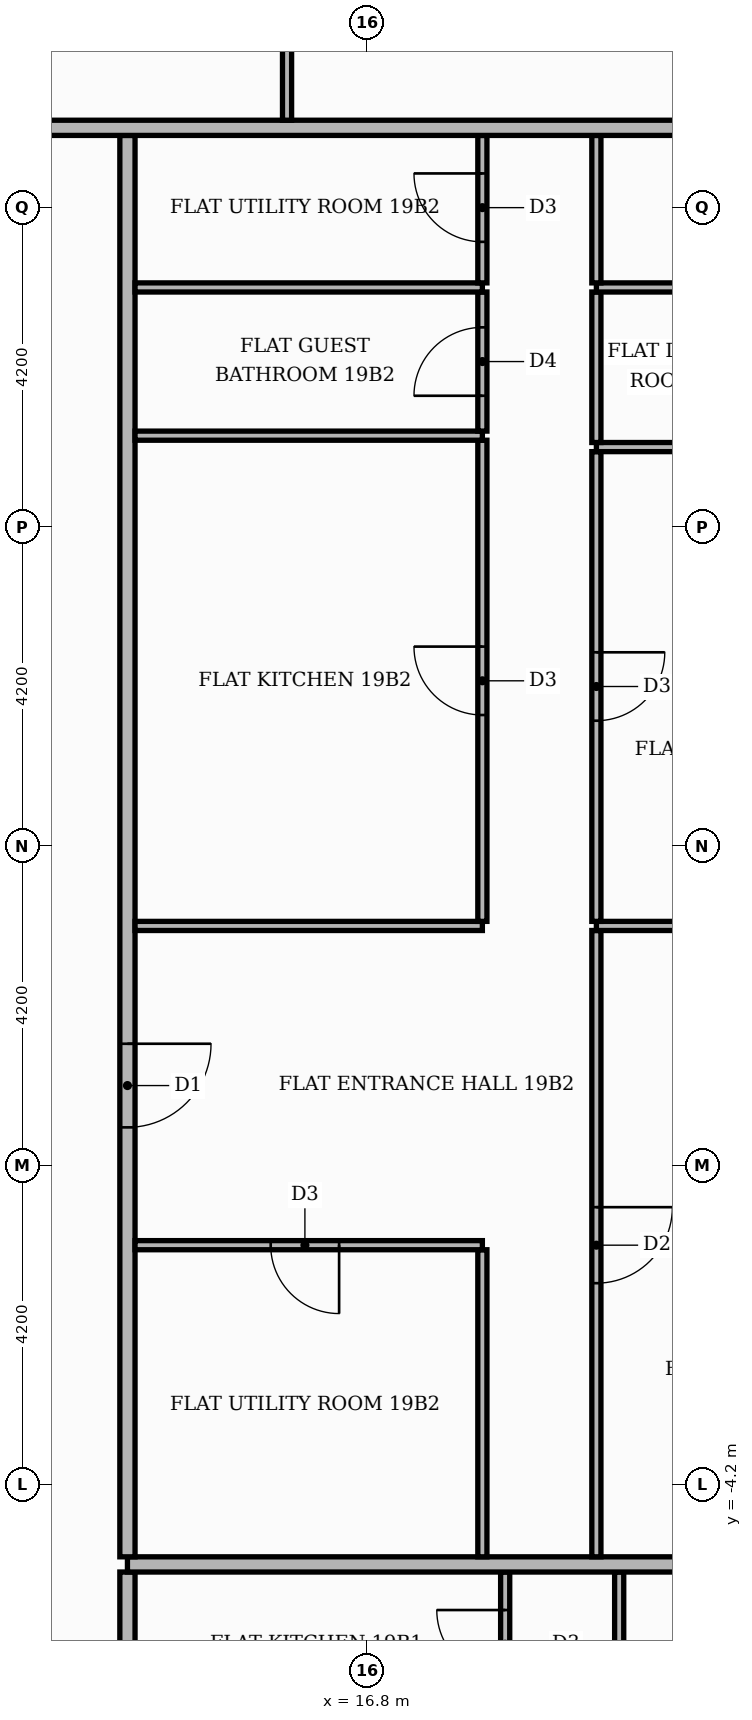
"""IFC4 building model, lengths in metres.
Left out: names, types, materials, properties, quantities, classifications, styles, units other than length and angle.
Written with IfcOpenShell. Run it as: python <this file> out.ifc"""

import sys

from ifc_helpers import new_model, si_unit, direction, frame, frame_2d, origin, place, context, subcontext, project, spatial, rectangle, extrude, element, fill, save


model = new_model("IFC4")
c1 = context("Model", 3, precision=1e-05, world=origin(), true_north=direction((0.0, 1.0)))
c2 = subcontext(c1, "Body", "Model", "MODEL_VIEW")
j1 = project(units=[si_unit("LENGTHUNIT", "METRE"), si_unit("PLANEANGLEUNIT", "RADIAN")], contexts=[c1])
p1 = place(None, origin())
s1 = spatial("IfcSite", under=j1, at=p1, CompositionType="ELEMENT")
p2 = place(p1, origin())
s2 = spatial("IfcBuilding", under=s1, at=p2, CompositionType="ELEMENT")
p3 = place(p2, frame((0.0, 0.0, 83.1)))
s3 = spatial("IfcBuildingStorey", under=s2, at=p3, CompositionType="ELEMENT", Elevation=83.1)
p4 = place(p3, frame((13.65, -13.55, 0.0), z_axis=(0.0, 0.0, 1.0), x_axis=(0.0, 1.0, 0.0)))
e1 = element("IfcWall", 1, at=p4, inside=s3, PredefinedType="PARTITIONING", context=c2, shape_type="SweptSolid", body=[
    extrude(rectangle(XDim=8.2, YDim=0.2, at=frame_2d((4.1, 0.0))), origin(), (0.0, 0.0, 1.0), 3.48),
])
p5 = place(p4, frame((1.45, 0.0, 0.0)))
e2 = element("IfcOpeningElement", 2, at=p5, cuts=e1, PredefinedType="OPENING", context=c2, shape_type="SweptSolid", body=[
    extrude(rectangle(XDim=1.1, YDim=2.4, at=frame_2d((0.55, 1.2))), frame((0.0, 0.11, 0.0), z_axis=(0.0, -1.0, 0.0), x_axis=(1.0, 0.0, 0.0)), (0.0, 0.0, 1.0), 0.22),
])
p6 = place(p3, frame((18.62, -7.29, 0.0), z_axis=(0.0, 0.0, 1.0), x_axis=(0.0, 1.0, 0.0)))
e3 = element("IfcWall", 3, at=p6, inside=s3, PredefinedType="PARTITIONING", context=c2, shape_type="SweptSolid", body=[
    extrude(rectangle(XDim=1.94, YDim=0.12, at=frame_2d((0.97, 0.0))), origin(), (0.0, 0.0, 1.0), 3.48),
])
p7 = place(p6, frame((0.54, 0.0, 0.0)))
e4 = element("IfcOpeningElement", 4, at=p7, cuts=e3, PredefinedType="OPENING", context=c2, shape_type="SweptSolid", body=[
    extrude(rectangle(XDim=0.9, YDim=2.1, at=frame_2d((0.45, 1.05))), frame((0.0, 0.07, 0.0), z_axis=(0.0, -1.0, 0.0), x_axis=(1.0, 0.0, 0.0)), (0.0, 0.0, 1.0), 0.14),
])
p8 = place(p3, frame((20.12, -7.29, 0.0), z_axis=(0.0, 0.0, 1.0), x_axis=(0.0, 1.0, 0.0)))
e5 = element("IfcWall", 5, at=p8, inside=s3, PredefinedType="PARTITIONING", context=c2, shape_type="SweptSolid", body=[
    extrude(rectangle(XDim=1.94, YDim=0.12, at=frame_2d((0.97, 0.0))), origin(), (0.0, 0.0, 1.0), 3.48),
])
p9 = place(p3, frame((13.65, -5.25, 0.0), z_axis=(0.0, 0.0, 1.0), x_axis=(1.0, 0.0, 0.0)))
e6 = element("IfcWall", 6, at=p9, inside=s3, PredefinedType="PARTITIONING", context=c2, shape_type="SweptSolid", body=[
    extrude(rectangle(XDim=11.77, YDim=0.2, at=frame_2d((5.885, 0.0))), origin(), (0.0, 0.0, 1.0), 3.48),
])
p10 = place(p3, frame((13.65, -5.15, 0.0), z_axis=(0.0, 0.0, 1.0), x_axis=(0.0, 1.0, 0.0)))
e7 = element("IfcWall", 7, at=p10, inside=s3, PredefinedType="PARTITIONING", context=c2, shape_type="SweptSolid", body=[
    extrude(rectangle(XDim=18.7, YDim=0.2, at=frame_2d((9.35, 0.0))), origin(), (0.0, 0.0, 1.0), 3.48),
])
p11 = place(p10, frame((5.65, 0.0, 0.0)))
e8 = element("IfcOpeningElement", 8, at=p11, cuts=e7, PredefinedType="OPENING", context=c2, shape_type="SweptSolid", body=[
    extrude(rectangle(XDim=1.1, YDim=2.4, at=frame_2d((0.55, 1.2))), frame((0.0, 0.11, 0.0), z_axis=(0.0, -1.0, 0.0), x_axis=(1.0, 0.0, 0.0)), (0.0, 0.0, 1.0), 0.22),
])
p12 = place(p3, frame((18.32, -5.15, 0.0), z_axis=(0.0, 0.0, 1.0), x_axis=(0.0, 1.0, 0.0)))
e9 = element("IfcWall", 9, at=p12, inside=s3, PredefinedType="PARTITIONING", context=c2, shape_type="SweptSolid", body=[
    extrude(rectangle(XDim=4.04, YDim=0.12, at=frame_2d((2.02, 0.0))), origin(), (0.0, 0.0, 1.0), 3.48),
])
p13 = place(p3, frame((19.82, -5.15, 0.0), z_axis=(0.0, 0.0, 1.0), x_axis=(0.0, 1.0, 0.0)))
e10 = element("IfcWall", 10, at=p13, inside=s3, PredefinedType="PARTITIONING", context=c2, shape_type="SweptSolid", body=[
    extrude(rectangle(XDim=8.24, YDim=0.12, at=frame_2d((4.12, 0.0))), origin(), (0.0, 0.0, 1.0), 3.48),
])
p14 = place(p13, frame((3.6, 0.0, 0.0)))
e11 = element("IfcOpeningElement", 11, at=p14, cuts=e10, PredefinedType="OPENING", context=c2, shape_type="SweptSolid", body=[
    extrude(rectangle(XDim=1.0, YDim=2.1, at=frame_2d((0.5, 1.05))), frame((0.0, 0.07, 0.0), z_axis=(0.0, -1.0, 0.0), x_axis=(1.0, 0.0, 0.0)), (0.0, 0.0, 1.0), 0.14),
])
p15 = place(p3, frame((13.75, -1.05, 0.0), z_axis=(0.0, 0.0, 1.0), x_axis=(1.0, 0.0, 0.0)))
e12 = element("IfcWall", 12, at=p15, inside=s3, PredefinedType="PARTITIONING", context=c2, shape_type="SweptSolid", body=[
    extrude(rectangle(XDim=4.57, YDim=0.12, at=frame_2d((2.285, 0.0))), origin(), (0.0, 0.0, 1.0), 3.48),
])
p16 = place(p15, frame((1.785, 0.0, 0.0)))
e13 = element("IfcOpeningElement", 13, at=p16, cuts=e12, PredefinedType="OPENING", context=c2, shape_type="SweptSolid", body=[
    extrude(rectangle(XDim=0.9, YDim=2.1, at=frame_2d((0.45, 1.05))), frame((0.0, 0.07, 0.0), z_axis=(0.0, -1.0, 0.0), x_axis=(1.0, 0.0, 0.0)), (0.0, 0.0, 1.0), 0.14),
])
p17 = place(p3, frame((13.75, 3.15, 0.0), z_axis=(0.0, 0.0, 1.0), x_axis=(1.0, 0.0, 0.0)))
e14 = element("IfcWall", 14, at=p17, inside=s3, PredefinedType="PARTITIONING", context=c2, shape_type="SweptSolid", body=[
    extrude(rectangle(XDim=4.57, YDim=0.12, at=frame_2d((2.285, 0.0))), origin(), (0.0, 0.0, 1.0), 3.48),
])
p18 = place(p3, frame((19.82, 3.15, 0.0), z_axis=(0.0, 0.0, 1.0), x_axis=(1.0, 0.0, 0.0)))
e15 = element("IfcWall", 15, at=p18, inside=s3, PredefinedType="PARTITIONING", context=c2, shape_type="SweptSolid", body=[
    extrude(rectangle(XDim=5.6, YDim=0.12, at=frame_2d((2.8, 0.0))), origin(), (0.0, 0.0, 1.0), 3.48),
])
p19 = place(p3, frame((18.32, 3.21, 0.0), z_axis=(0.0, 0.0, 1.0), x_axis=(0.0, 1.0, 0.0)))
e16 = element("IfcWall", 16, at=p19, inside=s3, PredefinedType="PARTITIONING", context=c2, shape_type="SweptSolid", body=[
    extrude(rectangle(XDim=6.33, YDim=0.12, at=frame_2d((3.165, 0.0))), origin(), (0.0, 0.0, 1.0), 3.48),
])
p20 = place(p19, frame((2.715, 0.0, 0.0)))
e17 = element("IfcOpeningElement", 17, at=p20, cuts=e16, PredefinedType="OPENING", context=c2, shape_type="SweptSolid", body=[
    extrude(rectangle(XDim=0.9, YDim=2.1, at=frame_2d((0.45, 1.05))), frame((0.0, 0.07, 0.0), z_axis=(0.0, -1.0, 0.0), x_axis=(1.0, 0.0, 0.0)), (0.0, 0.0, 1.0), 0.14),
])
p21 = place(p3, frame((19.82, 3.21, 0.0), z_axis=(0.0, 0.0, 1.0), x_axis=(0.0, 1.0, 0.0)))
e18 = element("IfcWall", 18, at=p21, inside=s3, PredefinedType="PARTITIONING", context=c2, shape_type="SweptSolid", body=[
    extrude(rectangle(XDim=6.18, YDim=0.12, at=frame_2d((3.09, 0.0))), origin(), (0.0, 0.0, 1.0), 3.48),
])
p22 = place(p21, frame((2.64, 0.0, 0.0)))
e19 = element("IfcOpeningElement", 19, at=p22, cuts=e18, PredefinedType="OPENING", context=c2, shape_type="SweptSolid", body=[
    extrude(rectangle(XDim=0.9, YDim=2.1, at=frame_2d((0.45, 1.05))), frame((0.0, 0.07, 0.0), z_axis=(0.0, -1.0, 0.0), x_axis=(1.0, 0.0, 0.0)), (0.0, 0.0, 1.0), 0.14),
])
p23 = place(p3, frame((19.82, 9.45, 0.0), z_axis=(0.0, 0.0, 1.0), x_axis=(1.0, 0.0, 0.0)))
e20 = element("IfcWall", 20, at=p23, inside=s3, PredefinedType="PARTITIONING", context=c2, shape_type="SweptSolid", body=[
    extrude(rectangle(XDim=5.6, YDim=0.12, at=frame_2d((2.8, 0.0))), origin(), (0.0, 0.0, 1.0), 3.48),
])
p24 = place(p23, frame((2.5, 0.0, 0.0)))
e21 = element("IfcOpeningElement", 21, at=p24, cuts=e20, PredefinedType="OPENING", context=c2, shape_type="SweptSolid", body=[
    extrude(rectangle(XDim=0.9, YDim=2.1, at=frame_2d((0.45, 1.05))), frame((0.0, 0.07, 0.0), z_axis=(0.0, -1.0, 0.0), x_axis=(1.0, 0.0, 0.0)), (0.0, 0.0, 1.0), 0.14),
])
p25 = place(p3, frame((19.82, 9.51, 0.0), z_axis=(0.0, 0.0, 1.0), x_axis=(0.0, 1.0, 0.0)))
e22 = element("IfcWall", 22, at=p25, inside=s3, PredefinedType="PARTITIONING", context=c2, shape_type="SweptSolid", body=[
    extrude(rectangle(XDim=1.98, YDim=0.12, at=frame_2d((0.99, 0.0))), origin(), (0.0, 0.0, 1.0), 3.48),
])
p26 = place(p3, frame((13.75, 9.6, 0.0), z_axis=(0.0, 0.0, 1.0), x_axis=(1.0, 0.0, 0.0)))
e23 = element("IfcWall", 23, at=p26, inside=s3, PredefinedType="PARTITIONING", context=c2, shape_type="SweptSolid", body=[
    extrude(rectangle(XDim=4.57, YDim=0.12, at=frame_2d((2.285, 0.0))), origin(), (0.0, 0.0, 1.0), 3.48),
])
p27 = place(p3, frame((18.32, 9.66, 0.0), z_axis=(0.0, 0.0, 1.0), x_axis=(0.0, 1.0, 0.0)))
e24 = element("IfcWall", 24, at=p27, inside=s3, PredefinedType="PARTITIONING", context=c2, shape_type="SweptSolid", body=[
    extrude(rectangle(XDim=1.83, YDim=0.12, at=frame_2d((0.915, 0.0))), origin(), (0.0, 0.0, 1.0), 3.48),
])
p28 = place(p27, frame((0.465, 0.0, 0.0)))
e25 = element("IfcOpeningElement", 25, at=p28, cuts=e24, PredefinedType="OPENING", context=c2, shape_type="SweptSolid", body=[
    extrude(rectangle(XDim=0.9, YDim=2.1, at=frame_2d((0.45, 1.05))), frame((0.0, 0.07, 0.0), z_axis=(0.0, -1.0, 0.0), x_axis=(1.0, 0.0, 0.0)), (0.0, 0.0, 1.0), 0.14),
])
p29 = place(p3, frame((13.75, 11.55, 0.0), z_axis=(0.0, 0.0, 1.0), x_axis=(1.0, 0.0, 0.0)))
e26 = element("IfcWall", 26, at=p29, inside=s3, PredefinedType="PARTITIONING", context=c2, shape_type="SweptSolid", body=[
    extrude(rectangle(XDim=4.57, YDim=0.12, at=frame_2d((2.285, 0.0))), origin(), (0.0, 0.0, 1.0), 3.48),
])
p30 = place(p3, frame((19.82, 11.55, 0.0), z_axis=(0.0, 0.0, 1.0), x_axis=(1.0, 0.0, 0.0)))
e27 = element("IfcWall", 27, at=p30, inside=s3, PredefinedType="PARTITIONING", context=c2, shape_type="SweptSolid", body=[
    extrude(rectangle(XDim=5.6, YDim=0.12, at=frame_2d((2.8, 0.0))), origin(), (0.0, 0.0, 1.0), 3.48),
])
p31 = place(p30, frame((2.5, 0.0, 0.0)))
e28 = element("IfcOpeningElement", 28, at=p31, cuts=e27, PredefinedType="OPENING", context=c2, shape_type="SweptSolid", body=[
    extrude(rectangle(XDim=0.9, YDim=2.1, at=frame_2d((0.45, 1.05))), frame((0.0, 0.07, 0.0), z_axis=(0.0, -1.0, 0.0), x_axis=(1.0, 0.0, 0.0)), (0.0, 0.0, 1.0), 0.14),
])
p32 = place(p3, frame((18.32, 11.61, 0.0), z_axis=(0.0, 0.0, 1.0), x_axis=(0.0, 1.0, 0.0)))
e29 = element("IfcWall", 29, at=p32, inside=s3, PredefinedType="PARTITIONING", context=c2, shape_type="SweptSolid", body=[
    extrude(rectangle(XDim=1.94, YDim=0.12, at=frame_2d((0.97, 0.0))), origin(), (0.0, 0.0, 1.0), 3.48),
])
p33 = place(p32, frame((0.54, 0.0, 0.0)))
e30 = element("IfcOpeningElement", 30, at=p33, cuts=e29, PredefinedType="OPENING", context=c2, shape_type="SweptSolid", body=[
    extrude(rectangle(XDim=0.9, YDim=2.1, at=frame_2d((0.45, 1.05))), frame((0.0, 0.07, 0.0), z_axis=(0.0, -1.0, 0.0), x_axis=(1.0, 0.0, 0.0)), (0.0, 0.0, 1.0), 0.14),
])
p34 = place(p3, frame((19.82, 11.61, 0.0), z_axis=(0.0, 0.0, 1.0), x_axis=(0.0, 1.0, 0.0)))
e31 = element("IfcWall", 31, at=p34, inside=s3, PredefinedType="PARTITIONING", context=c2, shape_type="SweptSolid", body=[
    extrude(rectangle(XDim=1.94, YDim=0.12, at=frame_2d((0.97, 0.0))), origin(), (0.0, 0.0, 1.0), 3.48),
])
p35 = place(p3, frame((-13.65, 13.65, 0.0), z_axis=(0.0, 0.0, 1.0), x_axis=(1.0, 0.0, 0.0)))
e32 = element("IfcWall", 32, at=p35, inside=s3, PredefinedType="PARTITIONING", context=c2, shape_type="SweptSolid", body=[
    extrude(rectangle(XDim=39.07, YDim=0.2, at=frame_2d((19.535, 0.0))), origin(), (0.0, 0.0, 1.0), 3.48),
])
p36 = place(p35, frame((24.65, 0.0, 0.0)))
e33 = element("IfcOpeningElement", 33, at=p36, cuts=e32, PredefinedType="OPENING", context=c2, shape_type="SweptSolid", body=[
    extrude(rectangle(XDim=1.1, YDim=2.4, at=frame_2d((0.55, 1.2))), frame((0.0, 0.11, 0.0), z_axis=(0.0, -1.0, 0.0), x_axis=(1.0, 0.0, 0.0)), (0.0, 0.0, 1.0), 0.22),
])
p37 = place(p35, frame((16.25, 0.0, 0.0)))
e34 = element("IfcOpeningElement", 34, at=p37, cuts=e32, PredefinedType="OPENING", context=c2, shape_type="SweptSolid", body=[
    extrude(rectangle(XDim=1.1, YDim=2.4, at=frame_2d((0.55, 1.2))), frame((0.0, 0.11, 0.0), z_axis=(0.0, -1.0, 0.0), x_axis=(1.0, 0.0, 0.0)), (0.0, 0.0, 1.0), 0.22),
])
p38 = place(p3, frame((15.75, 13.75, 0.0), z_axis=(0.0, 0.0, 1.0), x_axis=(0.0, 1.0, 0.0)))
e35 = element("IfcWall", 35, at=p38, inside=s3, PredefinedType="PARTITIONING", context=c2, shape_type="SweptSolid", body=[
    extrude(rectangle(XDim=6.01, YDim=0.12, at=frame_2d((3.005, 0.0))), origin(), (0.0, 0.0, 1.0), 3.48),
])
p39 = place(p38, frame((2.485, 0.0, 0.0)))
e36 = element("IfcOpeningElement", 36, at=p39, cuts=e35, PredefinedType="OPENING", context=c2, shape_type="SweptSolid", body=[
    extrude(rectangle(XDim=1.0, YDim=2.1, at=frame_2d((0.5, 1.05))), frame((0.0, 0.07, 0.0), z_axis=(0.0, -1.0, 0.0), x_axis=(1.0, 0.0, 0.0)), (0.0, 0.0, 1.0), 0.14),
])
p40 = place(p7, origin())
e37 = element("IfcDoor", 37, at=p40, inside=s3, OperationType="SINGLE_SWING_RIGHT", PredefinedType="DOOR", context=c2, shape_type="SweptSolid", body=[
    extrude(rectangle(XDim=0.9, YDim=2.1, at=frame_2d((0.45, 1.05))), frame((0.0, 0.025, 0.0), z_axis=(0.0, -1.0, 0.0), x_axis=(1.0, 0.0, 0.0)), (0.0, 0.0, 1.0), 0.05),
])
fill(e4, e37)
p41 = place(p11, frame((1.1, 0.0, 0.0), z_axis=(0.0, 0.0, 1.0), x_axis=(-1.0, 0.0, 0.0)))
e38 = element("IfcDoor", 38, at=p41, inside=s3, OperationType="SINGLE_SWING_RIGHT", PredefinedType="DOOR", context=c2, shape_type="SweptSolid", body=[
    extrude(rectangle(XDim=1.1, YDim=2.4, at=frame_2d((0.55, 1.2))), frame((0.0, 0.025, 0.0), z_axis=(0.0, -1.0, 0.0), x_axis=(1.0, 0.0, 0.0)), (0.0, 0.0, 1.0), 0.05),
])
fill(e8, e38)
p42 = place(p16, frame((0.9, 0.0, 0.0), z_axis=(0.0, 0.0, 1.0), x_axis=(-1.0, 0.0, 0.0)))
e39 = element("IfcDoor", 39, at=p42, inside=s3, OperationType="SINGLE_SWING_RIGHT", PredefinedType="DOOR", context=c2, shape_type="SweptSolid", body=[
    extrude(rectangle(XDim=0.9, YDim=2.1, at=frame_2d((0.45, 1.05))), frame((0.0, 0.025, 0.0), z_axis=(0.0, -1.0, 0.0), x_axis=(1.0, 0.0, 0.0)), (0.0, 0.0, 1.0), 0.05),
])
fill(e13, e39)
p43 = place(p20, origin())
e40 = element("IfcDoor", 40, at=p43, inside=s3, OperationType="SINGLE_SWING_RIGHT", PredefinedType="DOOR", context=c2, shape_type="SweptSolid", body=[
    extrude(rectangle(XDim=0.9, YDim=2.1, at=frame_2d((0.45, 1.05))), frame((0.0, 0.025, 0.0), z_axis=(0.0, -1.0, 0.0), x_axis=(1.0, 0.0, 0.0)), (0.0, 0.0, 1.0), 0.05),
])
fill(e17, e40)
p44 = place(p28, origin())
e41 = element("IfcDoor", 41, at=p44, inside=s3, OperationType="SINGLE_SWING_LEFT", PredefinedType="DOOR", context=c2, shape_type="SweptSolid", body=[
    extrude(rectangle(XDim=0.9, YDim=2.1, at=frame_2d((0.45, 1.05))), frame((0.0, 0.025, 0.0), z_axis=(0.0, -1.0, 0.0), x_axis=(1.0, 0.0, 0.0)), (0.0, 0.0, 1.0), 0.05),
])
fill(e25, e41)
p45 = place(p33, origin())
e42 = element("IfcDoor", 42, at=p45, inside=s3, OperationType="SINGLE_SWING_RIGHT", PredefinedType="DOOR", context=c2, shape_type="SweptSolid", body=[
    extrude(rectangle(XDim=0.9, YDim=2.1, at=frame_2d((0.45, 1.05))), frame((0.0, 0.025, 0.0), z_axis=(0.0, -1.0, 0.0), x_axis=(1.0, 0.0, 0.0)), (0.0, 0.0, 1.0), 0.05),
])
fill(e30, e42)
p46 = place(p14, frame((1.0, 0.0, 0.0), z_axis=(0.0, 0.0, 1.0), x_axis=(-1.0, 0.0, 0.0)))
e43 = element("IfcDoor", 43, at=p46, inside=s3, OperationType="SINGLE_SWING_RIGHT", PredefinedType="DOOR", context=c2, shape_type="SweptSolid", body=[
    extrude(rectangle(XDim=1.0, YDim=2.1, at=frame_2d((0.5, 1.05))), frame((0.0, 0.025, 0.0), z_axis=(0.0, -1.0, 0.0), x_axis=(1.0, 0.0, 0.0)), (0.0, 0.0, 1.0), 0.05),
])
fill(e11, e43)
p47 = place(p22, frame((0.9, 0.0, 0.0), z_axis=(0.0, 0.0, 1.0), x_axis=(-1.0, 0.0, 0.0)))
e44 = element("IfcDoor", 44, at=p47, inside=s3, OperationType="SINGLE_SWING_RIGHT", PredefinedType="DOOR", context=c2, shape_type="SweptSolid", body=[
    extrude(rectangle(XDim=0.9, YDim=2.1, at=frame_2d((0.45, 1.05))), frame((0.0, 0.025, 0.0), z_axis=(0.0, -1.0, 0.0), x_axis=(1.0, 0.0, 0.0)), (0.0, 0.0, 1.0), 0.05),
])
fill(e19, e44)
save(model, sys.argv[1])
